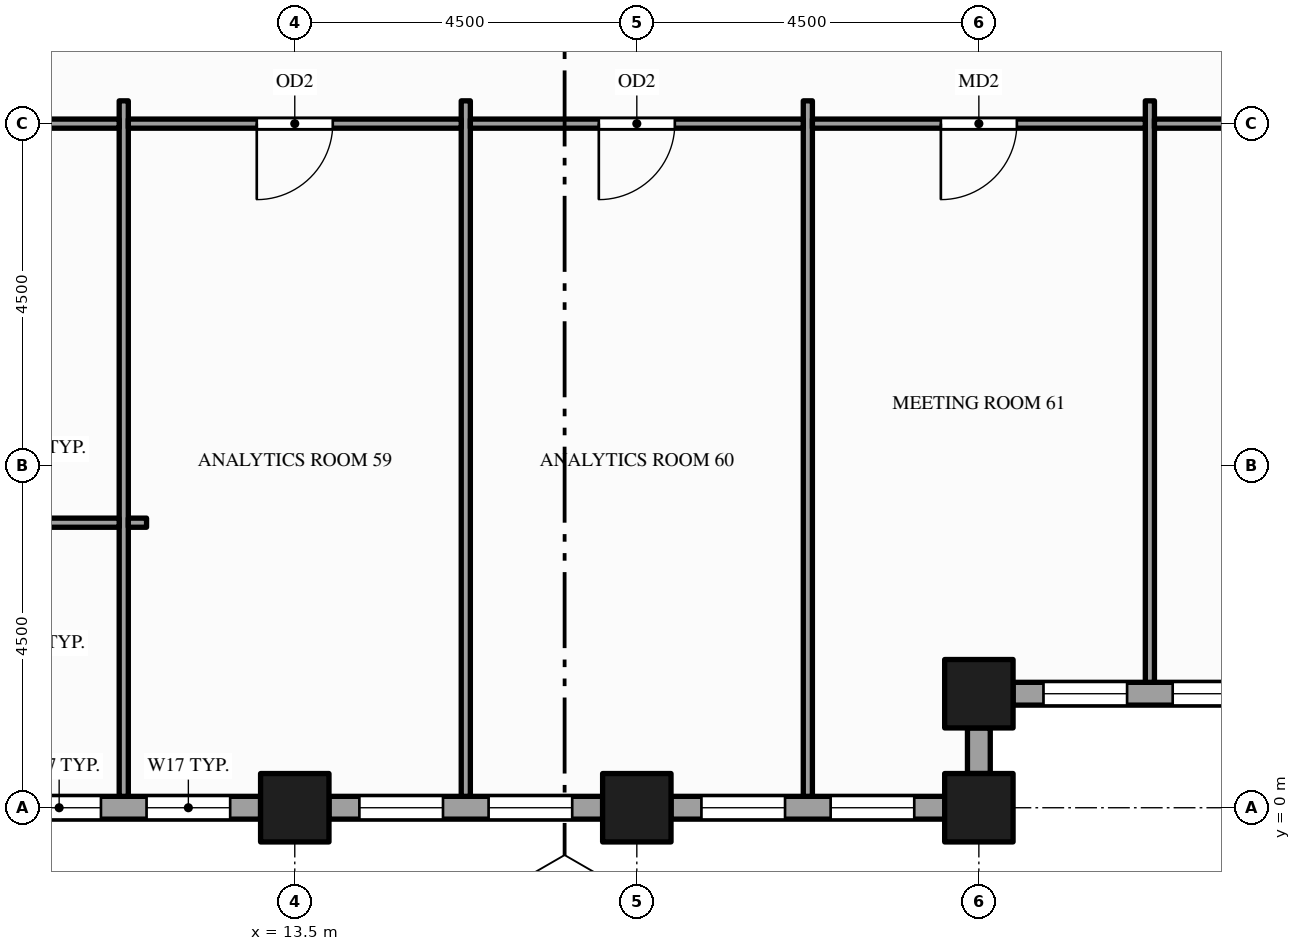
"""IFC4 building model, lengths in metres.
Left out: names, types, materials, properties, quantities, classifications, styles, units other than length and angle.
Written with IfcOpenShell. Run it as: python <this file> out.ifc"""

import sys

from ifc_helpers import new_model, si_unit, direction, frame, frame_2d, origin, origin_2d, place, context, subcontext, project, spatial, rectangle, hollow_rectangle, extrude, element, fill, save


model = new_model("IFC4")
c1 = context("Model", 3, precision=1e-05, world=origin(), true_north=direction((0.0, 1.0)))
c2 = subcontext(c1, "Body", "Model", "MODEL_VIEW")
j1 = project(units=[si_unit("LENGTHUNIT", "METRE"), si_unit("PLANEANGLEUNIT", "RADIAN")], contexts=[c1])
p1 = place(None, origin())
s1 = spatial("IfcSite", under=j1, at=p1, CompositionType="ELEMENT")
p2 = place(p1, origin())
s2 = spatial("IfcBuilding", under=s1, at=p2, CompositionType="ELEMENT")
p3 = place(p2, frame((0.0, 0.0, 151.0)))
s3 = spatial("IfcBuildingStorey", under=s2, at=p3, CompositionType="ELEMENT", Elevation=151.0)
for number, where, z_axis, x_axis in (
    (1, (13.5, 0.0, -0.15), (0.0, 0.0, 1.0), (1.0, 0.0, 0.0)),
    (2, (18.0, 0.0, -0.15), (0.0, 0.0, 1.0), (1.0, 0.0, 0.0)),
    (3, (22.5, 0.0, -0.15), (0.0, 0.0, 1.0), (1.0, 0.0, 0.0)),
    (4, (22.5, 1.5, -0.15), (0.0, 0.0, 1.0), (1.0, 0.0, 0.0)),
):
    element("IfcColumn", number, at=place(p3, frame(where, z_axis=z_axis, x_axis=x_axis)), inside=s3, PredefinedType="COLUMN", context=c2, shape_type="SweptSolid", body=[
        extrude(hollow_rectangle(XDim=0.9, YDim=0.9, WallThickness=0.045, at=origin_2d()), origin(), (0.0, 0.0, 1.0), 4.0),
    ])
p4 = place(p3, frame((9.45, 0.0, 0.0), z_axis=(0.0, 0.0, 1.0), x_axis=(1.0, 0.0, 0.0)))
e5 = element("IfcWall", 5, at=p4, inside=s3, PredefinedType="STANDARD", context=c2, shape_type="SweptSolid", body=[
    extrude(rectangle(XDim=3.6, YDim=0.3, at=frame_2d((1.8, 0.0))), origin(), (0.0, 0.0, 1.0), 2.87),
])
p5 = place(p4, frame((0.4, 0.0, 0.9)))
e6 = element("IfcOpeningElement", 6, at=p5, cuts=e5, PredefinedType="OPENING", context=c2, shape_type="SweptSolid", body=[
    extrude(rectangle(XDim=1.1, YDim=1.75, at=frame_2d((0.55, 0.875))), frame((0.0, 0.16, 0.0), z_axis=(0.0, -1.0, 0.0), x_axis=(1.0, 0.0, 0.0)), (0.0, 0.0, 1.0), 0.32),
])
p6 = place(p4, frame((2.1, 0.0, 0.9)))
e7 = element("IfcOpeningElement", 7, at=p6, cuts=e5, PredefinedType="OPENING", context=c2, shape_type="SweptSolid", body=[
    extrude(rectangle(XDim=1.1, YDim=1.75, at=frame_2d((0.55, 0.875))), frame((0.0, 0.16, 0.0), z_axis=(0.0, -1.0, 0.0), x_axis=(1.0, 0.0, 0.0)), (0.0, 0.0, 1.0), 0.32),
])
p7 = place(p3, frame((13.95, 0.0, 0.0), z_axis=(0.0, 0.0, 1.0), x_axis=(1.0, 0.0, 0.0)))
e8 = element("IfcWall", 8, at=p7, inside=s3, PredefinedType="STANDARD", context=c2, shape_type="SweptSolid", body=[
    extrude(rectangle(XDim=3.6, YDim=0.3, at=frame_2d((1.8, 0.0))), origin(), (0.0, 0.0, 1.0), 2.87),
])
p8 = place(p7, frame((0.4, 0.0, 0.9)))
e9 = element("IfcOpeningElement", 9, at=p8, cuts=e8, PredefinedType="OPENING", context=c2, shape_type="SweptSolid", body=[
    extrude(rectangle(XDim=1.1, YDim=1.75, at=frame_2d((0.55, 0.875))), frame((0.0, 0.16, 0.0), z_axis=(0.0, -1.0, 0.0), x_axis=(1.0, 0.0, 0.0)), (0.0, 0.0, 1.0), 0.32),
])
p9 = place(p7, frame((2.1, 0.0, 0.9)))
e10 = element("IfcOpeningElement", 10, at=p9, cuts=e8, PredefinedType="OPENING", context=c2, shape_type="SweptSolid", body=[
    extrude(rectangle(XDim=1.1, YDim=1.75, at=frame_2d((0.55, 0.875))), frame((0.0, 0.16, 0.0), z_axis=(0.0, -1.0, 0.0), x_axis=(1.0, 0.0, 0.0)), (0.0, 0.0, 1.0), 0.32),
])
p10 = place(p3, frame((18.45, 0.0, 0.0), z_axis=(0.0, 0.0, 1.0), x_axis=(1.0, 0.0, 0.0)))
e11 = element("IfcWall", 11, at=p10, inside=s3, PredefinedType="STANDARD", context=c2, shape_type="SweptSolid", body=[
    extrude(rectangle(XDim=3.6, YDim=0.3, at=frame_2d((1.8, 0.0))), origin(), (0.0, 0.0, 1.0), 2.87),
])
p11 = place(p10, frame((0.4, 0.0, 0.9)))
e12 = element("IfcOpeningElement", 12, at=p11, cuts=e11, PredefinedType="OPENING", context=c2, shape_type="SweptSolid", body=[
    extrude(rectangle(XDim=1.1, YDim=1.75, at=frame_2d((0.55, 0.875))), frame((0.0, 0.16, 0.0), z_axis=(0.0, -1.0, 0.0), x_axis=(1.0, 0.0, 0.0)), (0.0, 0.0, 1.0), 0.32),
])
p12 = place(p10, frame((2.1, 0.0, 0.9)))
e13 = element("IfcOpeningElement", 13, at=p12, cuts=e11, PredefinedType="OPENING", context=c2, shape_type="SweptSolid", body=[
    extrude(rectangle(XDim=1.1, YDim=1.75, at=frame_2d((0.55, 0.875))), frame((0.0, 0.16, 0.0), z_axis=(0.0, -1.0, 0.0), x_axis=(1.0, 0.0, 0.0)), (0.0, 0.0, 1.0), 0.32),
])
p13 = place(p3, frame((22.5, 0.45, 0.0), z_axis=(0.0, 0.0, 1.0), x_axis=(0.0, 1.0, 0.0)))
e14 = element("IfcWall", 14, at=p13, inside=s3, PredefinedType="STANDARD", context=c2, shape_type="SweptSolid", body=[
    extrude(rectangle(XDim=0.6, YDim=0.3, at=frame_2d((0.3, 0.0))), origin(), (0.0, 0.0, 1.0), 3.149),
])
p14 = place(p3, frame((22.95, 1.5, 0.0), z_axis=(0.0, 0.0, 1.0), x_axis=(1.0, 0.0, 0.0)))
e15 = element("IfcWall", 15, at=p14, inside=s3, PredefinedType="STANDARD", context=c2, shape_type="SweptSolid", body=[
    extrude(rectangle(XDim=3.6, YDim=0.3, at=frame_2d((1.8, 0.0))), origin(), (0.0, 0.0, 1.0), 2.87),
])
p15 = place(p14, frame((0.4, 0.0, 0.9)))
e16 = element("IfcOpeningElement", 16, at=p15, cuts=e15, PredefinedType="OPENING", context=c2, shape_type="SweptSolid", body=[
    extrude(rectangle(XDim=1.1, YDim=1.75, at=frame_2d((0.55, 0.875))), frame((0.0, 0.16, 0.0), z_axis=(0.0, -1.0, 0.0), x_axis=(1.0, 0.0, 0.0)), (0.0, 0.0, 1.0), 0.32),
])
p16 = place(p14, frame((2.1, 0.0, 0.9)))
e17 = element("IfcOpeningElement", 17, at=p16, cuts=e15, PredefinedType="OPENING", context=c2, shape_type="SweptSolid", body=[
    extrude(rectangle(XDim=1.1, YDim=1.75, at=frame_2d((0.55, 0.875))), frame((0.0, 0.16, 0.0), z_axis=(0.0, -1.0, 0.0), x_axis=(1.0, 0.0, 0.0)), (0.0, 0.0, 1.0), 0.32),
])
for number, where, z_axis, x_axis in (
    (18, (11.25, 0.15, 0.0), (0.0, 0.0, 1.0), (0.0, 1.0, 0.0)),
    (19, (15.75, 0.15, 0.0), (0.0, 0.0, 1.0), (0.0, 1.0, 0.0)),
    (20, (20.25, 0.15, 0.0), (0.0, 0.0, 1.0), (0.0, 1.0, 0.0)),
):
    element("IfcWall", number, at=place(p3, frame(where, z_axis=z_axis, x_axis=x_axis)), inside=s3, PredefinedType="PARTITIONING", context=c2, shape_type="SweptSolid", body=[
        extrude(rectangle(XDim=9.15, YDim=0.12, at=frame_2d((4.575, 0.0))), origin(), (0.0, 0.0, 1.0), 2.87),
    ])
p17 = place(p3, frame((24.75, 1.65, 0.0), z_axis=(0.0, 0.0, 1.0), x_axis=(0.0, 1.0, 0.0)))
e21 = element("IfcWall", 21, at=p17, inside=s3, PredefinedType="PARTITIONING", context=c2, shape_type="SweptSolid", body=[
    extrude(rectangle(XDim=7.65, YDim=0.12, at=frame_2d((3.825, 0.0))), origin(), (0.0, 0.0, 1.0), 2.87),
])
p18 = place(p3, frame((9.125, 3.75, 0.0), z_axis=(0.0, 0.0, 1.0), x_axis=(1.0, 0.0, 0.0)))
e22 = element("IfcWall", 22, at=p18, inside=s3, PredefinedType="PARTITIONING", context=c2, shape_type="SweptSolid", body=[
    extrude(rectangle(XDim=2.065, YDim=0.12, at=frame_2d((1.032, 0.0))), origin(), (0.0, 0.0, 1.0), 2.87),
])
p19 = place(p3, frame((11.31, 3.75, 0.0), z_axis=(0.0, 0.0, 1.0), x_axis=(1.0, 0.0, 0.0)))
e23 = element("IfcWall", 23, at=p19, inside=s3, PredefinedType="PARTITIONING", context=c2, shape_type="SweptSolid", body=[
    extrude(rectangle(XDim=0.24, YDim=0.12, at=frame_2d((0.12, 0.0))), origin(), (0.0, 0.0, 1.0), 2.87),
])
p20 = place(p3, frame((0.15, 9.0, 0.0), z_axis=(0.0, 0.0, 1.0), x_axis=(1.0, 0.0, 0.0)))
e24 = element("IfcWall", 24, at=p20, inside=s3, PredefinedType="PARTITIONING", context=c2, shape_type="SweptSolid", body=[
    extrude(rectangle(XDim=11.04, YDim=0.12, at=frame_2d((5.52, 0.0))), origin(), (0.0, 0.0, 1.0), 2.87),
])
p21 = place(p20, frame((4.93, 0.0, 0.0)))
e25 = element("IfcOpeningElement", 25, at=p21, cuts=e24, PredefinedType="OPENING", context=c2, shape_type="SweptSolid", body=[
    extrude(rectangle(XDim=1.2, YDim=2.1, at=frame_2d((0.6, 1.05))), frame((0.0, 0.07, 0.0), z_axis=(0.0, -1.0, 0.0), x_axis=(1.0, 0.0, 0.0)), (0.0, 0.0, 1.0), 0.14),
])
p22 = place(p3, frame((11.31, 9.0, 0.0), z_axis=(0.0, 0.0, 1.0), x_axis=(1.0, 0.0, 0.0)))
e26 = element("IfcWall", 26, at=p22, inside=s3, PredefinedType="PARTITIONING", context=c2, shape_type="SweptSolid", body=[
    extrude(rectangle(XDim=4.38, YDim=0.12, at=frame_2d((2.19, 0.0))), origin(), (0.0, 0.0, 1.0), 2.87),
])
p23 = place(p22, frame((1.69, 0.0, 0.0)))
e27 = element("IfcOpeningElement", 27, at=p23, cuts=e26, PredefinedType="OPENING", context=c2, shape_type="SweptSolid", body=[
    extrude(rectangle(XDim=1.0, YDim=2.1, at=frame_2d((0.5, 1.05))), frame((0.0, 0.07, 0.0), z_axis=(0.0, -1.0, 0.0), x_axis=(1.0, 0.0, 0.0)), (0.0, 0.0, 1.0), 0.14),
])
p24 = place(p3, frame((15.81, 9.0, 0.0), z_axis=(0.0, 0.0, 1.0), x_axis=(1.0, 0.0, 0.0)))
e28 = element("IfcWall", 28, at=p24, inside=s3, PredefinedType="PARTITIONING", context=c2, shape_type="SweptSolid", body=[
    extrude(rectangle(XDim=4.38, YDim=0.12, at=frame_2d((2.19, 0.0))), origin(), (0.0, 0.0, 1.0), 2.87),
])
p25 = place(p24, frame((1.69, 0.0, 0.0)))
e29 = element("IfcOpeningElement", 29, at=p25, cuts=e28, PredefinedType="OPENING", context=c2, shape_type="SweptSolid", body=[
    extrude(rectangle(XDim=1.0, YDim=2.1, at=frame_2d((0.5, 1.05))), frame((0.0, 0.07, 0.0), z_axis=(0.0, -1.0, 0.0), x_axis=(1.0, 0.0, 0.0)), (0.0, 0.0, 1.0), 0.14),
])
p26 = place(p3, frame((20.31, 9.0, 0.0), z_axis=(0.0, 0.0, 1.0), x_axis=(1.0, 0.0, 0.0)))
e30 = element("IfcWall", 30, at=p26, inside=s3, PredefinedType="PARTITIONING", context=c2, shape_type="SweptSolid", body=[
    extrude(rectangle(XDim=4.38, YDim=0.12, at=frame_2d((2.19, 0.0))), origin(), (0.0, 0.0, 1.0), 2.87),
])
p27 = place(p26, frame((1.69, 0.0, 0.0)))
e31 = element("IfcOpeningElement", 31, at=p27, cuts=e30, PredefinedType="OPENING", context=c2, shape_type="SweptSolid", body=[
    extrude(rectangle(XDim=1.0, YDim=2.1, at=frame_2d((0.5, 1.05))), frame((0.0, 0.07, 0.0), z_axis=(0.0, -1.0, 0.0), x_axis=(1.0, 0.0, 0.0)), (0.0, 0.0, 1.0), 0.14),
])
p28 = place(p3, frame((24.81, 9.0, 0.0), z_axis=(0.0, 0.0, 1.0), x_axis=(1.0, 0.0, 0.0)))
e32 = element("IfcWall", 32, at=p28, inside=s3, PredefinedType="PARTITIONING", context=c2, shape_type="SweptSolid", body=[
    extrude(rectangle(XDim=6.63, YDim=0.12, at=frame_2d((3.315, 0.0))), origin(), (0.0, 0.0, 1.0), 2.87),
])
p29 = place(p28, frame((2.815, 0.0, 0.0)))
e33 = element("IfcOpeningElement", 33, at=p29, cuts=e32, PredefinedType="OPENING", context=c2, shape_type="SweptSolid", body=[
    extrude(rectangle(XDim=1.0, YDim=2.1, at=frame_2d((0.5, 1.05))), frame((0.0, 0.07, 0.0), z_axis=(0.0, -1.0, 0.0), x_axis=(1.0, 0.0, 0.0)), (0.0, 0.0, 1.0), 0.14),
])
p30 = place(p5, origin())
e34 = element("IfcWindow", 34, at=p30, inside=s3, PartitioningType="SINGLE_PANEL", PredefinedType="WINDOW", context=c2, shape_type="SweptSolid", body=[
    extrude(rectangle(XDim=1.1, YDim=1.75, at=frame_2d((0.55, 0.875))), frame((0.0, 0.03, 0.0), z_axis=(0.0, -1.0, 0.0), x_axis=(1.0, 0.0, 0.0)), (0.0, 0.0, 1.0), 0.06),
])
fill(e6, e34)
p31 = place(p6, origin())
e35 = element("IfcWindow", 35, at=p31, inside=s3, PartitioningType="SINGLE_PANEL", PredefinedType="WINDOW", context=c2, shape_type="SweptSolid", body=[
    extrude(rectangle(XDim=1.1, YDim=1.75, at=frame_2d((0.55, 0.875))), frame((0.0, 0.03, 0.0), z_axis=(0.0, -1.0, 0.0), x_axis=(1.0, 0.0, 0.0)), (0.0, 0.0, 1.0), 0.06),
])
fill(e7, e35)
p32 = place(p8, origin())
e36 = element("IfcWindow", 36, at=p32, inside=s3, PartitioningType="SINGLE_PANEL", PredefinedType="WINDOW", context=c2, shape_type="SweptSolid", body=[
    extrude(rectangle(XDim=1.1, YDim=1.75, at=frame_2d((0.55, 0.875))), frame((0.0, 0.03, 0.0), z_axis=(0.0, -1.0, 0.0), x_axis=(1.0, 0.0, 0.0)), (0.0, 0.0, 1.0), 0.06),
])
fill(e9, e36)
p33 = place(p9, origin())
e37 = element("IfcWindow", 37, at=p33, inside=s3, PartitioningType="SINGLE_PANEL", PredefinedType="WINDOW", context=c2, shape_type="SweptSolid", body=[
    extrude(rectangle(XDim=1.1, YDim=1.75, at=frame_2d((0.55, 0.875))), frame((0.0, 0.03, 0.0), z_axis=(0.0, -1.0, 0.0), x_axis=(1.0, 0.0, 0.0)), (0.0, 0.0, 1.0), 0.06),
])
fill(e10, e37)
p34 = place(p11, origin())
e38 = element("IfcWindow", 38, at=p34, inside=s3, PartitioningType="SINGLE_PANEL", PredefinedType="WINDOW", context=c2, shape_type="SweptSolid", body=[
    extrude(rectangle(XDim=1.1, YDim=1.75, at=frame_2d((0.55, 0.875))), frame((0.0, 0.03, 0.0), z_axis=(0.0, -1.0, 0.0), x_axis=(1.0, 0.0, 0.0)), (0.0, 0.0, 1.0), 0.06),
])
fill(e12, e38)
p35 = place(p12, origin())
e39 = element("IfcWindow", 39, at=p35, inside=s3, PartitioningType="SINGLE_PANEL", PredefinedType="WINDOW", context=c2, shape_type="SweptSolid", body=[
    extrude(rectangle(XDim=1.1, YDim=1.75, at=frame_2d((0.55, 0.875))), frame((0.0, 0.03, 0.0), z_axis=(0.0, -1.0, 0.0), x_axis=(1.0, 0.0, 0.0)), (0.0, 0.0, 1.0), 0.06),
])
fill(e13, e39)
p36 = place(p15, origin())
e40 = element("IfcWindow", 40, at=p36, inside=s3, PartitioningType="SINGLE_PANEL", PredefinedType="WINDOW", context=c2, shape_type="SweptSolid", body=[
    extrude(rectangle(XDim=1.1, YDim=1.75, at=frame_2d((0.55, 0.875))), frame((0.0, 0.03, 0.0), z_axis=(0.0, -1.0, 0.0), x_axis=(1.0, 0.0, 0.0)), (0.0, 0.0, 1.0), 0.06),
])
fill(e16, e40)
p37 = place(p16, origin())
e41 = element("IfcWindow", 41, at=p37, inside=s3, PartitioningType="SINGLE_PANEL", PredefinedType="WINDOW", context=c2, shape_type="SweptSolid", body=[
    extrude(rectangle(XDim=1.1, YDim=1.75, at=frame_2d((0.55, 0.875))), frame((0.0, 0.03, 0.0), z_axis=(0.0, -1.0, 0.0), x_axis=(1.0, 0.0, 0.0)), (0.0, 0.0, 1.0), 0.06),
])
fill(e17, e41)
p38 = place(p23, origin())
e42 = element("IfcDoor", 42, at=p38, inside=s3, OperationType="SINGLE_SWING_LEFT", PredefinedType="DOOR", context=c2, shape_type="SweptSolid", body=[
    extrude(rectangle(XDim=1.0, YDim=2.1, at=frame_2d((0.5, 1.05))), frame((0.0, 0.025, 0.0), z_axis=(0.0, -1.0, 0.0), x_axis=(1.0, 0.0, 0.0)), (0.0, 0.0, 1.0), 0.05),
])
fill(e27, e42)
p39 = place(p25, origin())
e43 = element("IfcDoor", 43, at=p39, inside=s3, OperationType="SINGLE_SWING_LEFT", PredefinedType="DOOR", context=c2, shape_type="SweptSolid", body=[
    extrude(rectangle(XDim=1.0, YDim=2.1, at=frame_2d((0.5, 1.05))), frame((0.0, 0.025, 0.0), z_axis=(0.0, -1.0, 0.0), x_axis=(1.0, 0.0, 0.0)), (0.0, 0.0, 1.0), 0.05),
])
fill(e29, e43)
p40 = place(p27, origin())
e44 = element("IfcDoor", 44, at=p40, inside=s3, OperationType="SINGLE_SWING_LEFT", PredefinedType="DOOR", context=c2, shape_type="SweptSolid", body=[
    extrude(rectangle(XDim=1.0, YDim=2.1, at=frame_2d((0.5, 1.05))), frame((0.0, 0.025, 0.0), z_axis=(0.0, -1.0, 0.0), x_axis=(1.0, 0.0, 0.0)), (0.0, 0.0, 1.0), 0.05),
])
fill(e31, e44)
save(model, sys.argv[1])
